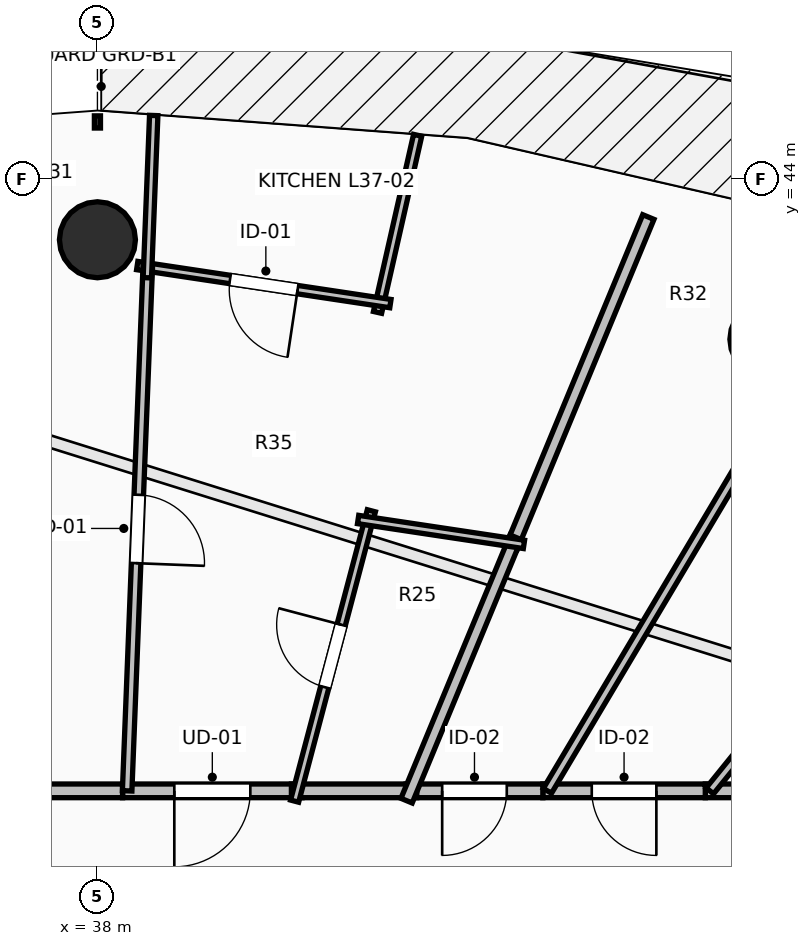
"""IFC4 building model, lengths in metres.
Left out: names, types, materials, properties, quantities, classifications, styles, units other than length and angle.
Written with IfcOpenShell. Run it as: python <this file> out.ifc"""

import sys

from ifc_helpers import new_model, si_unit, direction, frame, frame_2d, origin, origin_2d, place, context, subcontext, project, spatial, rectangle, circle, extrude, element, fill, save


model = new_model("IFC4")
c1 = context("Model", 3, precision=1e-05, world=origin(), true_north=direction((0.0, 1.0)))
c2 = subcontext(c1, "Body", "Model", "MODEL_VIEW")
j1 = project(units=[si_unit("LENGTHUNIT", "METRE"), si_unit("PLANEANGLEUNIT", "RADIAN")], contexts=[c1])
p1 = place(None, origin())
s1 = spatial("IfcSite", under=j1, at=p1, CompositionType="ELEMENT")
p2 = place(p1, origin())
s2 = spatial("IfcBuilding", under=s1, at=p2, CompositionType="ELEMENT")
p3 = place(p2, frame((0.0, 0.0, 139.6)))
s3 = spatial("IfcBuildingStorey", under=s2, at=p3, CompositionType="ELEMENT", Elevation=139.6)
for number, where, z_axis, x_axis in (
    (1, (46.821, 41.891, 0.0), (0.0, 0.0, 1.0), (0.383, 0.924, 0.0)),
    (2, (38.0, 43.2, 0.0), (0.0, 0.0, 1.0), (0.0, 1.0, 0.0)),
):
    element("IfcColumn", number, at=place(p3, frame(where, z_axis=z_axis, x_axis=x_axis)), inside=s3, PredefinedType="COLUMN", context=c2, shape_type="SweptSolid", body=[
        extrude(circle(Radius=0.5, at=origin_2d()), origin(), (0.0, 0.0, 1.0), 3.5),
    ])
p4 = place(p3, frame((48.704, 35.95, 0.0), z_axis=(0.0, 0.0, 1.0), x_axis=(-1.0, 0.0, 0.0)))
e3 = element("IfcWall", 3, at=p4, inside=s3, PredefinedType="PARTITIONING", context=c2, shape_type="SweptSolid", body=[
    extrude(rectangle(XDim=2.707, YDim=0.18, at=frame_2d((1.354, 0.0))), origin(), (0.0, 0.0, 1.0), 2.432),
])
p5 = place(p3, frame((45.997, 35.95, 0.0), z_axis=(0.0, 0.0, 1.0), x_axis=(-1.0, 0.0, 0.0)))
e4 = element("IfcWall", 4, at=p5, inside=s3, PredefinedType="PARTITIONING", context=c2, shape_type="SweptSolid", body=[
    extrude(rectangle(XDim=2.137, YDim=0.18, at=frame_2d((1.068, 0.0))), origin(), (0.0, 0.0, 1.0), 2.972),
])
p6 = place(p5, frame((0.644, 0.0, 0.0)))
e5 = element("IfcOpeningElement", 5, at=p6, cuts=e4, PredefinedType="OPENING", context=c2, shape_type="SweptSolid", body=[
    extrude(rectangle(XDim=0.85, YDim=2.1, at=frame_2d((0.425, 1.05))), frame((0.0, 0.105, 0.0), z_axis=(0.0, -1.0, 0.0), x_axis=(1.0, 0.0, 0.0)), (0.0, 0.0, 1.0), 0.21),
])
p7 = place(p3, frame((43.86, 35.95, 0.0), z_axis=(0.0, 0.0, 1.0), x_axis=(-1.0, 0.0, 0.0)))
e6 = element("IfcWall", 6, at=p7, inside=s3, PredefinedType="PARTITIONING", context=c2, shape_type="SweptSolid", body=[
    extrude(rectangle(XDim=1.799, YDim=0.18, at=frame_2d((0.899, 0.0))), origin(), (0.0, 0.0, 1.0), 3.24),
])
p8 = place(p7, frame((0.475, 0.0, 0.0)))
e7 = element("IfcOpeningElement", 7, at=p8, cuts=e6, PredefinedType="OPENING", context=c2, shape_type="SweptSolid", body=[
    extrude(rectangle(XDim=0.85, YDim=2.1, at=frame_2d((0.425, 1.05))), frame((0.0, 0.105, 0.0), z_axis=(0.0, -1.0, 0.0), x_axis=(1.0, 0.0, 0.0)), (0.0, 0.0, 1.0), 0.21),
])
p9 = place(p3, frame((40.692, 35.95, 0.0), z_axis=(0.0, 0.0, 1.0), x_axis=(-1.0, 0.0, 0.0)))
e8 = element("IfcWall", 8, at=p9, inside=s3, PredefinedType="PARTITIONING", context=c2, shape_type="SweptSolid", body=[
    extrude(rectangle(XDim=2.361, YDim=0.18, at=frame_2d((1.18, 0.0))), origin(), (0.0, 0.0, 1.0), 3.24),
])
p10 = place(p9, frame((0.68, 0.0, 0.0)))
e9 = element("IfcOpeningElement", 9, at=p10, cuts=e8, PredefinedType="OPENING", context=c2, shape_type="SweptSolid", body=[
    extrude(rectangle(XDim=1.0, YDim=2.15, at=frame_2d((0.5, 1.075))), frame((0.0, 0.105, 0.0), z_axis=(0.0, -1.0, 0.0), x_axis=(1.0, 0.0, 0.0)), (0.0, 0.0, 1.0), 0.21),
])
p11 = place(p3, frame((42.201, 35.95, 0.0), z_axis=(0.0, 0.0, 1.0), x_axis=(-1.0, 0.0, 0.0)))
e10 = element("IfcWall", 10, at=p11, inside=s3, PredefinedType="PARTITIONING", context=c2, shape_type="SweptSolid", body=[
    extrude(rectangle(XDim=1.649, YDim=0.18, at=frame_2d((0.824, 0.0))), origin(), (0.0, 0.0, 1.0), 3.24),
])
p12 = place(p3, frame((38.331, 35.95, 0.0), z_axis=(0.0, 0.0, 1.0), x_axis=(-1.0, 0.0, 0.0)))
e11 = element("IfcWall", 11, at=p12, inside=s3, PredefinedType="PARTITIONING", context=c2, shape_type="SweptSolid", body=[
    extrude(rectangle(XDim=1.437, YDim=0.18, at=frame_2d((0.719, 0.0))), origin(), (0.0, 0.0, 1.0), 3.24),
])
p13 = place(p3, frame((50.908, 41.94, 0.0), z_axis=(0.0, 0.0, 1.0), x_axis=(-0.62935766896, -0.77711577292, 0.0)))
e12 = element("IfcWall", 12, at=p13, inside=s3, PredefinedType="PARTITIONING", context=c2, shape_type="SweptSolid", body=[
    extrude(rectangle(XDim=7.708, YDim=0.125, at=frame_2d((3.854, 0.0))), origin(), (0.0, 0.0, 1.0), 2.432),
])
p14 = place(p3, frame((48.148, 43.057, 0.0), z_axis=(0.0, 0.0, 1.0), x_axis=(-0.511279346901, -0.859414585304, 0.0)))
e13 = element("IfcWall", 13, at=p14, inside=s3, PredefinedType="PARTITIONING", context=c2, shape_type="SweptSolid", body=[
    extrude(rectangle(XDim=8.27, YDim=0.125, at=frame_2d((4.135, 0.0))), origin(), (0.0, 0.0, 1.0), 2.432),
])
p15 = place(p3, frame((45.248, 43.499, 0.0), z_axis=(0.0, 0.0, 1.0), x_axis=(-0.382708032219, -0.923869342535, 0.0)))
e14 = element("IfcWall", 14, at=p15, inside=s3, PredefinedType="PARTITIONING", context=c2, shape_type="SweptSolid", body=[
    extrude(rectangle(XDim=4.701, YDim=0.16, at=frame_2d((2.351, 0.0))), origin(), (0.0, 0.0, 1.0), 2.728),
])
p16 = place(p3, frame((43.503, 39.285, 0.0), z_axis=(0.0, 0.0, 1.0), x_axis=(-0.382733183699, -0.923858923265, 0.0)))
e15 = element("IfcWall", 15, at=p16, inside=s3, PredefinedType="PARTITIONING", context=c2, shape_type="SweptSolid", body=[
    extrude(rectangle(XDim=3.75, YDim=0.16, at=frame_2d((1.875, 0.0))), origin(), (0.0, 0.0, 1.0), 2.922),
])
p17 = place(p3, frame((40.594, 35.815, 0.0), z_axis=(0.0, 0.0, 1.0), x_axis=(0.255512094359, 0.966805859331, 0.0)))
e16 = element("IfcWall", 16, at=p17, inside=s3, PredefinedType="PARTITIONING", context=c2, shape_type="SweptSolid", body=[
    extrude(rectangle(XDim=3.951, YDim=0.11, at=frame_2d((1.976, 0.0))), origin(), (0.0, 0.0, 1.0), 2.922),
])
p18 = place(p17, frame((1.551, 0.0, 0.0)))
e17 = element("IfcOpeningElement", 17, at=p18, cuts=e16, PredefinedType="OPENING", context=c2, shape_type="SweptSolid", body=[
    extrude(rectangle(XDim=0.85, YDim=2.1, at=frame_2d((0.425, 1.05))), frame((0.0, 0.07, 0.0), z_axis=(0.0, -1.0, 0.0), x_axis=(1.0, 0.0, 0.0)), (0.0, 0.0, 1.0), 0.14),
])
p19 = place(p3, frame((41.43, 39.52, 0.0), z_axis=(0.0, 0.0, 1.0), x_axis=(0.98891036234, -0.148513619769, 0.0)))
e18 = element("IfcWall", 18, at=p19, inside=s3, PredefinedType="PARTITIONING", context=c2, shape_type="SweptSolid", body=[
    extrude(rectangle(XDim=2.206, YDim=0.11, at=frame_2d((1.103, 0.0))), origin(), (0.0, 0.0, 1.0), 2.922),
])
p20 = place(p3, frame((42.213, 44.574, 0.0), z_axis=(0.0, 0.0, 1.0), x_axis=(-0.220932027223, -0.975289208054, 0.0)))
e19 = element("IfcWall", 19, at=p20, inside=s3, PredefinedType="PARTITIONING", context=c2, shape_type="SweptSolid", body=[
    extrude(rectangle(XDim=2.389, YDim=0.11, at=frame_2d((1.195, 0.0))), origin(), (0.0, 0.0, 1.0), 2.728),
])
p21 = place(p3, frame((41.854, 42.36, 0.0), z_axis=(0.0, 0.0, 1.0), x_axis=(-0.988887919082, 0.148662986296, 0.0)))
e20 = element("IfcWall", 20, at=p21, inside=s3, PredefinedType="PARTITIONING", context=c2, shape_type="SweptSolid", body=[
    extrude(rectangle(XDim=3.368, YDim=0.11, at=frame_2d((1.684, 0.0))), origin(), (0.0, 0.0, 1.0), 3.24),
])
p22 = place(p21, frame((1.234, 0.0, 0.0)))
e21 = element("IfcOpeningElement", 21, at=p22, cuts=e20, PredefinedType="OPENING", context=c2, shape_type="SweptSolid", body=[
    extrude(rectangle(XDim=0.9, YDim=2.1, at=frame_2d((0.45, 1.05))), frame((0.0, 0.07, 0.0), z_axis=(0.0, -1.0, 0.0), x_axis=(1.0, 0.0, 0.0)), (0.0, 0.0, 1.0), 0.14),
])
p23 = place(p3, frame((38.662, 42.84, 0.0), z_axis=(0.0, 0.0, 1.0), x_axis=(-0.039300632457, -0.999227431713, 0.0)))
e22 = element("IfcWall", 22, at=p23, inside=s3, PredefinedType="PARTITIONING", context=c2, shape_type="SweptSolid", body=[
    extrude(rectangle(XDim=6.896, YDim=0.125, at=frame_2d((3.448, 0.0))), origin(), (0.0, 0.0, 1.0), 2.922),
])
p24 = place(p23, frame((2.998, 0.0, 0.0)))
e23 = element("IfcOpeningElement", 23, at=p24, cuts=e22, PredefinedType="OPENING", context=c2, shape_type="SweptSolid", body=[
    extrude(rectangle(XDim=0.9, YDim=2.1, at=frame_2d((0.45, 1.05))), frame((0.0, 0.077, 0.0), z_axis=(0.0, -1.0, 0.0), x_axis=(1.0, 0.0, 0.0)), (0.0, 0.0, 1.0), 0.155),
])
p25 = place(p3, frame((38.74, 44.835, 0.0), z_axis=(0.0, 0.0, 1.0), x_axis=(-0.039310852952, -0.999227029679, 0.0)))
e24 = element("IfcWall", 24, at=p25, inside=s3, PredefinedType="PARTITIONING", context=c2, shape_type="SweptSolid", body=[
    extrude(rectangle(XDim=2.136, YDim=0.11, at=frame_2d((1.068, 0.0))), origin(), (0.0, 0.0, 1.0), 2.728),
])
p26 = place(p10, origin())
e25 = element("IfcDoor", 25, at=p26, inside=s3, OperationType="SINGLE_SWING_RIGHT", PredefinedType="DOOR", context=c2, shape_type="SweptSolid", body=[
    extrude(rectangle(XDim=1.0, YDim=2.15, at=frame_2d((0.5, 1.075))), frame((0.0, 0.025, 0.0), z_axis=(0.0, -1.0, 0.0), x_axis=(1.0, 0.0, 0.0)), (0.0, 0.0, 1.0), 0.05),
])
fill(e9, e25)
p27 = place(p18, origin())
e26 = element("IfcDoor", 26, at=p27, inside=s3, OperationType="SINGLE_SWING_RIGHT", PredefinedType="DOOR", context=c2, shape_type="SweptSolid", body=[
    extrude(rectangle(XDim=0.85, YDim=2.1, at=frame_2d((0.425, 1.05))), frame((0.0, 0.025, 0.0), z_axis=(0.0, -1.0, 0.0), x_axis=(1.0, 0.0, 0.0)), (0.0, 0.0, 1.0), 0.05),
])
fill(e17, e26)
p28 = place(p22, origin())
e27 = element("IfcDoor", 27, at=p28, inside=s3, OperationType="SINGLE_SWING_LEFT", PredefinedType="DOOR", context=c2, shape_type="SweptSolid", body=[
    extrude(rectangle(XDim=0.9, YDim=2.1, at=frame_2d((0.45, 1.05))), frame((0.0, 0.025, 0.0), z_axis=(0.0, -1.0, 0.0), x_axis=(1.0, 0.0, 0.0)), (0.0, 0.0, 1.0), 0.05),
])
fill(e21, e27)
p29 = place(p24, origin())
e28 = element("IfcDoor", 28, at=p29, inside=s3, OperationType="SINGLE_SWING_RIGHT", PredefinedType="DOOR", context=c2, shape_type="SweptSolid", body=[
    extrude(rectangle(XDim=0.9, YDim=2.1, at=frame_2d((0.45, 1.05))), frame((0.0, 0.025, 0.0), z_axis=(0.0, -1.0, 0.0), x_axis=(1.0, 0.0, 0.0)), (0.0, 0.0, 1.0), 0.05),
])
fill(e23, e28)
p30 = place(p6, origin())
e29 = element("IfcDoor", 29, at=p30, inside=s3, OperationType="SINGLE_SWING_LEFT", PredefinedType="DOOR", context=c2, shape_type="SweptSolid", body=[
    extrude(rectangle(XDim=0.85, YDim=2.1, at=frame_2d((0.425, 1.05))), frame((0.0, 0.025, 0.0), z_axis=(0.0, -1.0, 0.0), x_axis=(1.0, 0.0, 0.0)), (0.0, 0.0, 1.0), 0.05),
])
fill(e5, e29)
p31 = place(p8, origin())
e30 = element("IfcDoor", 30, at=p31, inside=s3, OperationType="SINGLE_SWING_RIGHT", PredefinedType="DOOR", context=c2, shape_type="SweptSolid", body=[
    extrude(rectangle(XDim=0.85, YDim=2.1, at=frame_2d((0.425, 1.05))), frame((0.0, 0.025, 0.0), z_axis=(0.0, -1.0, 0.0), x_axis=(1.0, 0.0, 0.0)), (0.0, 0.0, 1.0), 0.05),
])
fill(e7, e30)
save(model, sys.argv[1])
